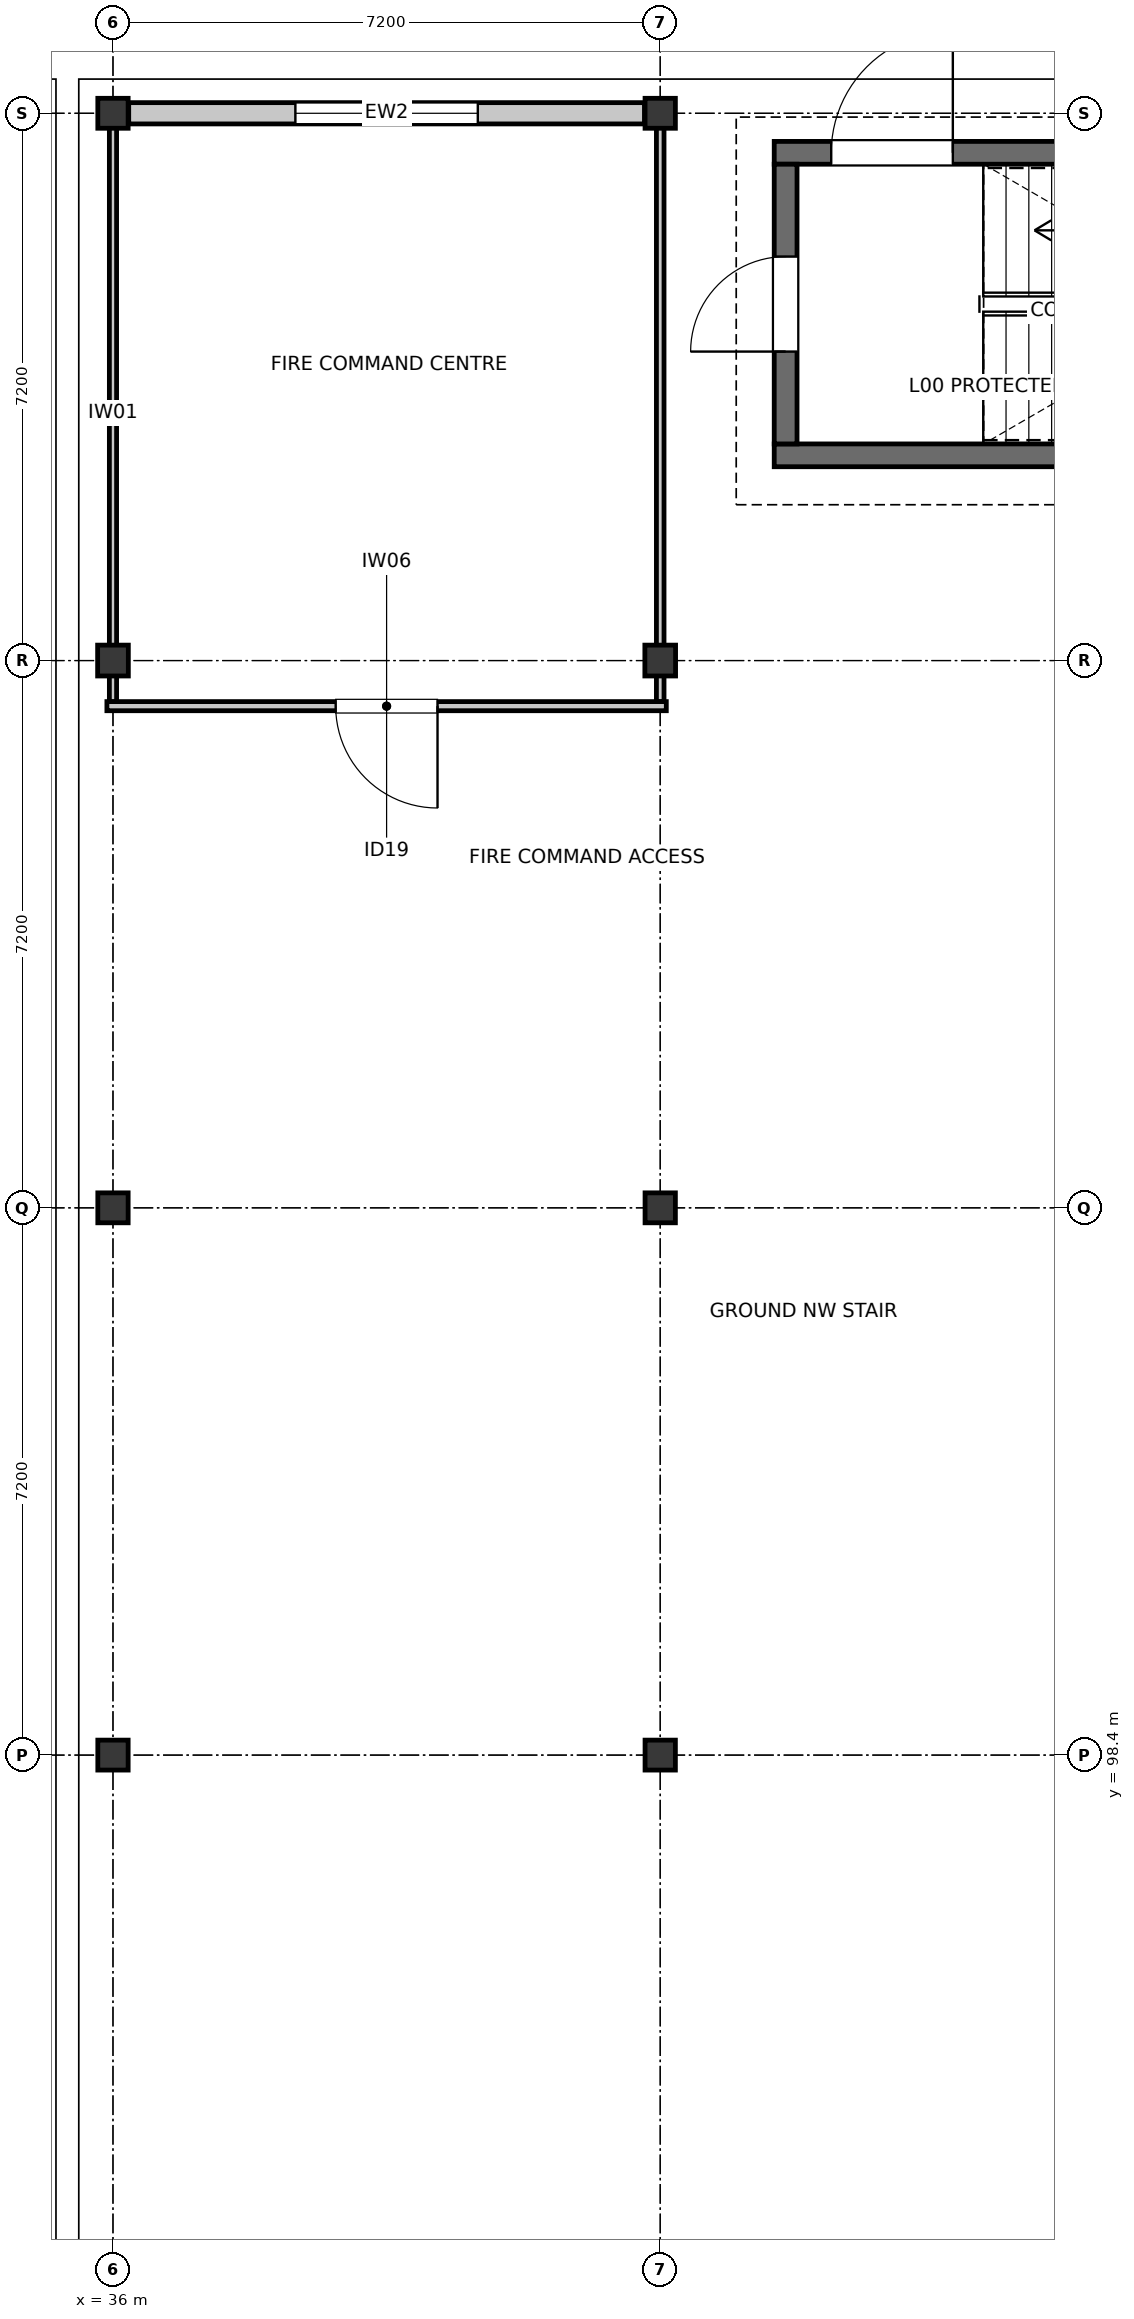
"""IFC4 building model, lengths in metres.
Left out: names, types, materials, properties, quantities, classifications, styles, units other than length and angle.
Written with IfcOpenShell. Run it as: python <this file> out.ifc"""

import sys

from ifc_helpers import new_model, si_unit, direction, frame, frame_2d, origin, origin_2d, place, context, subcontext, project, spatial, rectangle, i_section, extrude, element, fill, save


model = new_model("IFC4")
c1 = context("Model", 3, precision=1e-05, world=origin(), true_north=direction((0.0, 1.0)))
c2 = subcontext(c1, "Body", "Model", "MODEL_VIEW")
j1 = project(units=[si_unit("LENGTHUNIT", "METRE"), si_unit("PLANEANGLEUNIT", "RADIAN")], contexts=[c1])
p1 = place(None, origin())
s1 = spatial("IfcSite", under=j1, at=p1, CompositionType="ELEMENT")
p2 = place(p1, origin())
s2 = spatial("IfcBuilding", under=s1, at=p2, CompositionType="ELEMENT")
p3 = place(p2, origin())
s3 = spatial("IfcBuildingStorey", under=s2, at=p3, CompositionType="ELEMENT", Elevation=0.0)
for number, where, z_axis, x_axis in (
    (1, (36.0, 98.4, 0.0), (0.0, 0.0, 1.0), (1.0, 0.0, 0.0)),
    (2, (36.0, 105.6, 0.0), (0.0, 0.0, 1.0), (1.0, 0.0, 0.0)),
):
    element("IfcColumn", number, at=place(p3, frame(where, z_axis=z_axis, x_axis=x_axis)), inside=s3, PredefinedType="COLUMN", context=c2, shape_type="SweptSolid", body=[
        extrude(i_section(OverallWidth=0.399, OverallDepth=0.394, WebThickness=0.023, FlangeThickness=0.037, FilletRadius=0.015, at=origin_2d()), origin(), (0.0, 0.0, 1.0), 5.4),
    ])
p4 = place(p3, frame((36.0, 112.8, 0.0), z_axis=(0.0, 0.0, 1.0), x_axis=(1.0, 0.0, 0.0)))
e3 = element("IfcColumn", 3, at=p4, inside=s3, PredefinedType="COLUMN", context=c2, shape_type="SweptSolid", body=[
    extrude(i_section(OverallWidth=0.404, OverallDepth=0.406, WebThickness=0.027, FlangeThickness=0.044, FilletRadius=0.015, at=origin_2d()), origin(), (0.0, 0.0, 1.0), 5.4),
])
for number, where, z_axis, x_axis in (
    (4, (36.0, 120.0, 0.0), (0.0, 0.0, 1.0), (1.0, 0.0, 0.0)),
    (5, (43.2, 98.4, 0.0), (0.0, 0.0, 1.0), (1.0, 0.0, 0.0)),
    (6, (43.2, 105.6, 0.0), (0.0, 0.0, 1.0), (1.0, 0.0, 0.0)),
):
    element("IfcColumn", number, at=place(p3, frame(where, z_axis=z_axis, x_axis=x_axis)), inside=s3, PredefinedType="COLUMN", context=c2, shape_type="SweptSolid", body=[
        extrude(i_section(OverallWidth=0.399, OverallDepth=0.394, WebThickness=0.023, FlangeThickness=0.037, FilletRadius=0.015, at=origin_2d()), origin(), (0.0, 0.0, 1.0), 5.4),
    ])
p5 = place(p3, frame((43.2, 112.8, 0.0), z_axis=(0.0, 0.0, 1.0), x_axis=(1.0, 0.0, 0.0)))
e7 = element("IfcColumn", 7, at=p5, inside=s3, PredefinedType="COLUMN", context=c2, shape_type="SweptSolid", body=[
    extrude(i_section(OverallWidth=0.404, OverallDepth=0.406, WebThickness=0.027, FlangeThickness=0.044, FilletRadius=0.015, at=origin_2d()), origin(), (0.0, 0.0, 1.0), 5.4),
])
p6 = place(p3, frame((43.2, 120.0, 0.0), z_axis=(0.0, 0.0, 1.0), x_axis=(1.0, 0.0, 0.0)))
e8 = element("IfcColumn", 8, at=p6, inside=s3, PredefinedType="COLUMN", context=c2, shape_type="SweptSolid", body=[
    extrude(i_section(OverallWidth=0.399, OverallDepth=0.394, WebThickness=0.023, FlangeThickness=0.037, FilletRadius=0.015, at=origin_2d()), origin(), (0.0, 0.0, 1.0), 5.4),
])
p7 = place(p3, frame((36.207, 120.0, 0.0), z_axis=(0.0, 0.0, 1.0), x_axis=(1.0, 0.0, 0.0)))
e9 = element("IfcWall", 9, at=p7, inside=s3, PredefinedType="STANDARD", context=c2, shape_type="SweptSolid", body=[
    extrude(rectangle(XDim=6.786, YDim=0.28, at=frame_2d((3.393, 0.0))), origin(), (0.0, 0.0, 1.0), 4.462),
])
p8 = place(p7, frame((2.193, 0.0, 1.05)))
e10 = element("IfcOpeningElement", 10, at=p8, cuts=e9, PredefinedType="OPENING", context=c2, shape_type="SweptSolid", body=[
    extrude(rectangle(XDim=2.4, YDim=1.5, at=frame_2d((1.2, 0.75))), frame((0.0, 0.15, 0.0), z_axis=(0.0, -1.0, 0.0), x_axis=(1.0, 0.0, 0.0)), (0.0, 0.0, 1.0), 0.3),
])
p9 = place(p3, frame((54.1, 115.5, 0.0), z_axis=(0.0, 0.0, 1.0), x_axis=(-1.0, 0.0, 0.0)))
e11 = element("IfcWall", 11, at=p9, inside=s3, PredefinedType="SOLIDWALL", context=c2, shape_type="SweptSolid", body=[
    extrude(rectangle(XDim=9.4, YDim=0.3, at=frame_2d((4.7, 0.0))), origin(), (0.0, 0.0, 1.0), 5.16),
])
p10 = place(p3, frame((44.7, 119.48, 0.0), z_axis=(0.0, 0.0, 1.0), x_axis=(1.0, 0.0, 0.0)))
e12 = element("IfcWall", 12, at=p10, inside=s3, PredefinedType="SOLIDWALL", context=c2, shape_type="SweptSolid", body=[
    extrude(rectangle(XDim=9.4, YDim=0.3, at=frame_2d((4.7, 0.0))), origin(), (0.0, 0.0, 1.0), 5.16),
])
p11 = place(p10, frame((0.75, 0.0, 0.0)))
e13 = element("IfcOpeningElement", 13, at=p11, cuts=e12, PredefinedType="OPENING", context=c2, shape_type="SweptSolid", body=[
    extrude(rectangle(XDim=1.6, YDim=2.15, at=frame_2d((0.8, 1.075))), frame((0.0, 0.16, 0.0), z_axis=(0.0, -1.0, 0.0), x_axis=(1.0, 0.0, 0.0)), (0.0, 0.0, 1.0), 0.32),
])
p12 = place(p3, frame((44.85, 115.65, 0.0), z_axis=(0.0, 0.0, 1.0), x_axis=(0.0, 1.0, 0.0)))
e14 = element("IfcWall", 14, at=p12, inside=s3, PredefinedType="SOLIDWALL", context=c2, shape_type="SweptSolid", body=[
    extrude(rectangle(XDim=3.68, YDim=0.3, at=frame_2d((1.84, 0.0))), origin(), (0.0, 0.0, 1.0), 5.16),
])
p13 = place(p12, frame((1.215, 0.0, 0.0)))
e15 = element("IfcOpeningElement", 15, at=p13, cuts=e14, PredefinedType="OPENING", context=c2, shape_type="SweptSolid", body=[
    extrude(rectangle(XDim=1.25, YDim=2.2, at=frame_2d((0.625, 1.1))), frame((0.0, 0.16, 0.0), z_axis=(0.0, -1.0, 0.0), x_axis=(1.0, 0.0, 0.0)), (0.0, 0.0, 1.0), 0.32),
])
p14 = place(p3, frame((43.28, 112.2, 0.0), z_axis=(0.0, 0.0, 1.0), x_axis=(-1.0, 0.0, 0.0)))
e16 = element("IfcWall", 16, at=p14, inside=s3, PredefinedType="PARTITIONING", context=c2, shape_type="SweptSolid", body=[
    extrude(rectangle(XDim=7.36, YDim=0.12, at=frame_2d((3.68, 0.0))), origin(), (0.0, 0.0, 1.0), 4.457),
])
p15 = place(p14, frame((3.01, 0.0, 0.0)))
e17 = element("IfcOpeningElement", 17, at=p15, cuts=e16, PredefinedType="OPENING", context=c2, shape_type="SweptSolid", body=[
    extrude(rectangle(XDim=1.34, YDim=2.16, at=frame_2d((0.67, 1.08))), frame((0.0, 0.07, 0.0), z_axis=(0.0, -1.0, 0.0), x_axis=(1.0, 0.0, 0.0)), (0.0, 0.0, 1.0), 0.14),
])
p16 = place(p3, frame((36.0, 112.262, 0.0), z_axis=(0.0, 0.0, 1.0), x_axis=(0.0, 1.0, 0.0)))
e18 = element("IfcWall", 18, at=p16, inside=s3, PredefinedType="PARTITIONING", context=c2, shape_type="SweptSolid", body=[
    extrude(rectangle(XDim=7.596, YDim=0.095, at=frame_2d((3.798, 0.0))), origin(), (0.0, 0.0, 1.0), 4.457),
])
p17 = place(p3, frame((43.2, 119.858, 0.0), z_axis=(0.0, 0.0, 1.0), x_axis=(0.0, -1.0, 0.0)))
e19 = element("IfcWall", 19, at=p17, inside=s3, PredefinedType="PARTITIONING", context=c2, shape_type="SweptSolid", body=[
    extrude(rectangle(XDim=7.596, YDim=0.1, at=frame_2d((3.798, 0.0))), origin(), (0.0, 0.0, 1.0), 4.457),
])
p18 = place(p8, origin())
e20 = element("IfcWindow", 20, at=p18, inside=s3, PartitioningType="SINGLE_PANEL", PredefinedType="WINDOW", context=c2, shape_type="SweptSolid", body=[
    extrude(rectangle(XDim=2.4, YDim=1.5, at=frame_2d((1.2, 0.75))), frame((0.0, 0.03, 0.0), z_axis=(0.0, -1.0, 0.0), x_axis=(1.0, 0.0, 0.0)), (0.0, 0.0, 1.0), 0.06),
])
fill(e10, e20)
p19 = place(p11, origin())
e21 = element("IfcDoor", 21, at=p19, inside=s3, OperationType="SINGLE_SWING_RIGHT", PredefinedType="DOOR", context=c2, shape_type="SweptSolid", body=[
    extrude(rectangle(XDim=1.6, YDim=2.15, at=frame_2d((0.8, 1.075))), frame((0.0, 0.025, 0.0), z_axis=(0.0, -1.0, 0.0), x_axis=(1.0, 0.0, 0.0)), (0.0, 0.0, 1.0), 0.05),
])
fill(e13, e21)
p20 = place(p13, origin())
e22 = element("IfcDoor", 22, at=p20, inside=s3, OperationType="SINGLE_SWING_LEFT", PredefinedType="DOOR", context=c2, shape_type="SweptSolid", body=[
    extrude(rectangle(XDim=1.25, YDim=2.2, at=frame_2d((0.625, 1.1))), frame((0.0, 0.025, 0.0), z_axis=(0.0, -1.0, 0.0), x_axis=(1.0, 0.0, 0.0)), (0.0, 0.0, 1.0), 0.05),
])
fill(e15, e22)
p21 = place(p15, origin())
e23 = element("IfcDoor", 23, at=p21, inside=s3, OperationType="SINGLE_SWING_LEFT", PredefinedType="DOOR", context=c2, shape_type="SweptSolid", body=[
    extrude(rectangle(XDim=1.34, YDim=2.16, at=frame_2d((0.67, 1.08))), frame((0.0, 0.025, 0.0), z_axis=(0.0, -1.0, 0.0), x_axis=(1.0, 0.0, 0.0)), (0.0, 0.0, 1.0), 0.05),
])
fill(e17, e23)
save(model, sys.argv[1])
